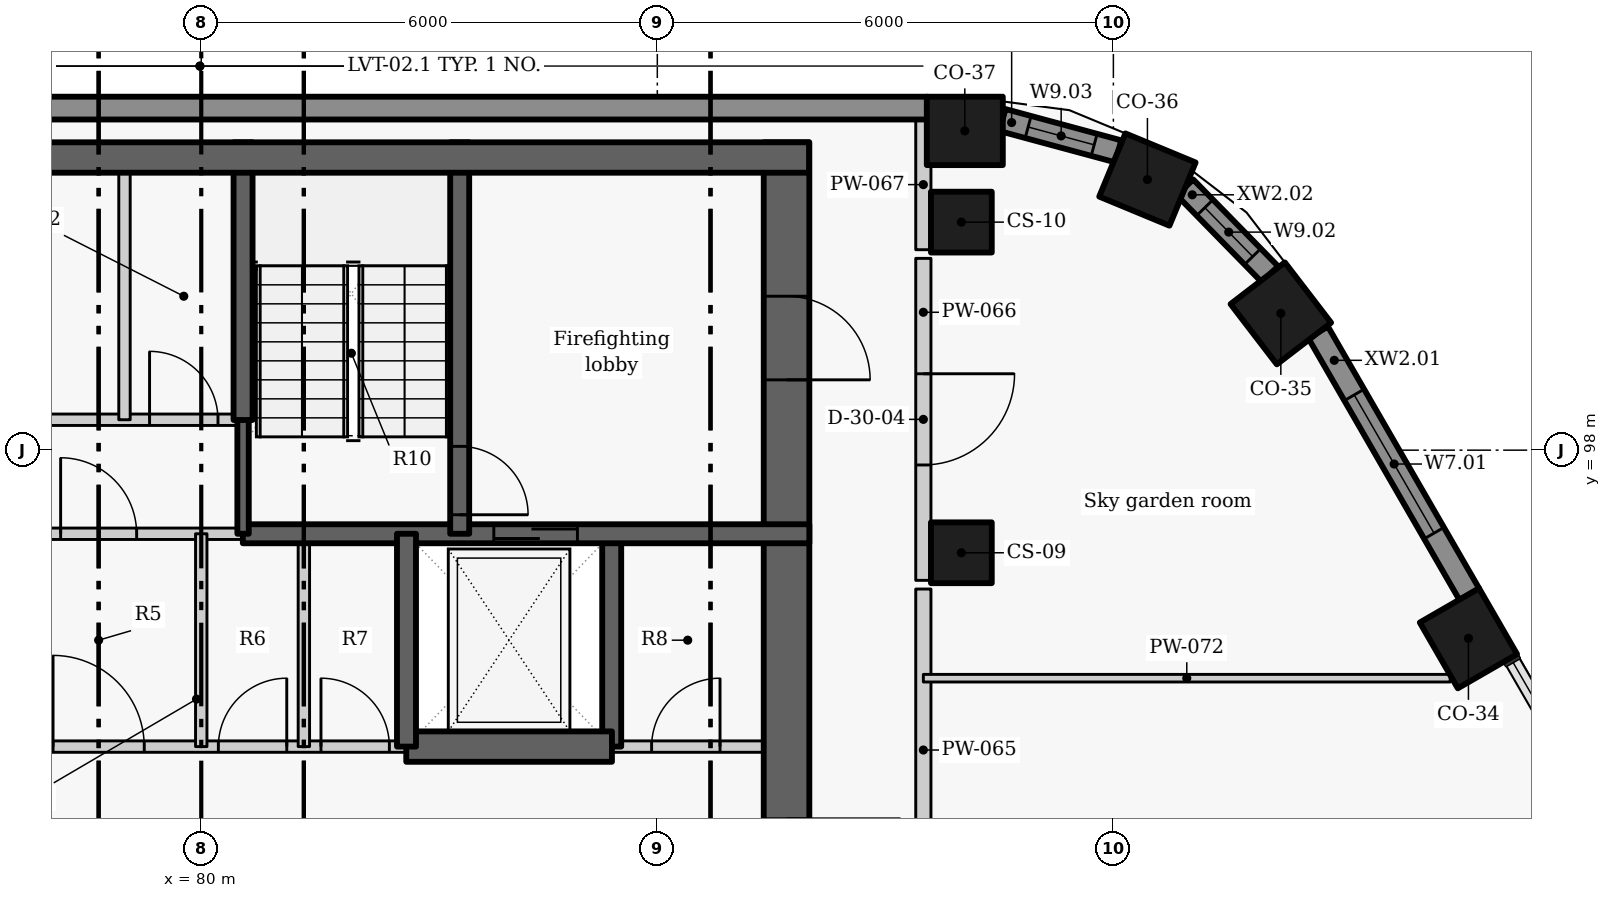
"""IFC4 building model, lengths in metres.
Left out: names, types, materials, properties, quantities, classifications, styles, units other than length and angle.
Written with IfcOpenShell. Run it as: python <this file> out.ifc"""

import sys

from ifc_helpers import new_model, si_unit, direction, frame, frame_2d, origin, origin_2d, place, context, subcontext, project, spatial, rectangle, extrude, element, fill, save


model = new_model("IFC4")
c1 = context("Model", 3, precision=1e-05, world=origin(), true_north=direction((0.0, 1.0)))
c2 = subcontext(c1, "Body", "Model", "MODEL_VIEW")
j1 = project(units=[si_unit("LENGTHUNIT", "METRE"), si_unit("PLANEANGLEUNIT", "RADIAN")], contexts=[c1])
p1 = place(None, origin())
s1 = spatial("IfcSite", under=j1, at=p1, CompositionType="ELEMENT")
p2 = place(p1, origin())
s2 = spatial("IfcBuilding", under=s1, at=p2, CompositionType="ELEMENT")
p3 = place(p2, frame((0.0, 0.0, 272.4)))
s3 = spatial("IfcBuildingStorey", under=s2, at=p3, CompositionType="ELEMENT", Elevation=272.4)
for number, where, z_axis, x_axis in (
    (1, (96.671, 95.525, 0.0), (0.0, 0.0, 1.0), (-0.5, 0.866, 0.0)),
    (2, (94.203, 99.8, 0.0), (0.0, 0.0, 1.0), (-0.609, 0.793, 0.0)),
    (3, (92.448, 101.56, 0.0), (0.0, 0.0, 1.0), (-0.924, 0.383, 0.0)),
    (4, (90.045, 102.2, 0.0), (0.0, 0.0, 1.0), (-1.0, 0.0, 0.0)),
):
    element("IfcColumn", number, at=place(p3, frame(where, z_axis=z_axis, x_axis=x_axis)), inside=s3, PredefinedType="COLUMN", context=c2, shape_type="SweptSolid", body=[
        extrude(rectangle(XDim=1.0, YDim=0.9, at=origin_2d()), origin(), (0.0, 0.0, 1.0), 3.6),
    ])
for number, where, z_axis, x_axis in (
    (5, (90.0, 96.65, 0.0), (0.0, 0.0, 1.0), (0.0, 1.0, 0.0)),
    (6, (90.0, 101.0, 0.0), (0.0, 0.0, 1.0), (0.0, 1.0, 0.0)),
):
    element("IfcColumn", number, at=place(p3, frame(where, z_axis=z_axis, x_axis=x_axis)), inside=s3, PredefinedType="COLUMN", context=c2, shape_type="SweptSolid", body=[
        extrude(rectangle(XDim=0.8, YDim=0.8, at=origin_2d()), origin(), (0.0, 0.0, 1.0), 3.6),
    ])
p4 = place(p3, frame((96.683, 96.104, 0.0), z_axis=(0.0, 0.0, 1.0), x_axis=(-0.500005687176, 0.866022120267, 0.0)))
e7 = element("IfcWall", 7, at=p4, inside=s3, PredefinedType="SOLIDWALL", context=c2, shape_type="SweptSolid", body=[
    extrude(rectangle(XDim=3.979, YDim=0.3, at=frame_2d((1.99, 0.0))), origin(), (0.0, 0.0, 1.0), 2.725),
])
p5 = place(p4, frame((0.928, 0.0, 0.9)))
e8 = element("IfcOpeningElement", 8, at=p5, cuts=e7, PredefinedType="OPENING", context=c2, shape_type="SweptSolid", body=[
    extrude(rectangle(XDim=2.1, YDim=1.1, at=frame_2d((1.05, 0.55))), frame((0.0, 0.16, 0.0), z_axis=(0.0, -1.0, 0.0), x_axis=(1.0, 0.0, 0.0)), (0.0, 0.0, 1.0), 0.32),
])
p6 = place(p3, frame((94.06, 100.315, 0.0), z_axis=(0.0, 0.0, 1.0), x_axis=(-0.6992720923, 0.714855608449, 0.0)))
e9 = element("IfcWall", 9, at=p6, inside=s3, PredefinedType="SOLIDWALL", context=c2, shape_type="SweptSolid", body=[
    extrude(rectangle(XDim=1.598, YDim=0.3, at=frame_2d((0.799, 0.0))), origin(), (0.0, 0.0, 1.0), 2.725),
])
p7 = place(p6, frame((0.325, 0.0, 0.9)))
e10 = element("IfcOpeningElement", 10, at=p7, cuts=e9, PredefinedType="OPENING", context=c2, shape_type="SweptSolid", body=[
    extrude(rectangle(XDim=0.9, YDim=1.1, at=frame_2d((0.45, 0.55))), frame((0.0, 0.16, 0.0), z_axis=(0.0, -1.0, 0.0), x_axis=(1.0, 0.0, 0.0)), (0.0, 0.0, 1.0), 0.32),
])
p8 = place(p3, frame((92.065, 101.931, 0.0), z_axis=(0.0, 0.0, 1.0), x_axis=(-0.965371819036, 0.260877846914, 0.0)))
e11 = element("IfcWall", 11, at=p8, inside=s3, PredefinedType="SOLIDWALL", context=c2, shape_type="SweptSolid", body=[
    extrude(rectangle(XDim=1.578, YDim=0.3, at=frame_2d((0.789, 0.0))), origin(), (0.0, 0.0, 1.0), 2.725),
])
p9 = place(p8, frame((0.329, 0.0, 0.9)))
e12 = element("IfcOpeningElement", 12, at=p9, cuts=e11, PredefinedType="OPENING", context=c2, shape_type="SweptSolid", body=[
    extrude(rectangle(XDim=0.9, YDim=1.1, at=frame_2d((0.45, 0.55))), frame((0.0, 0.16, 0.0), z_axis=(0.0, -1.0, 0.0), x_axis=(1.0, 0.0, 0.0)), (0.0, 0.0, 1.0), 0.32),
])
p10 = place(p3, frame((89.549, 102.5, 0.0), z_axis=(0.0, 0.0, 1.0), x_axis=(-1.0, 0.0, 0.0)))
e13 = element("IfcWall", 13, at=p10, inside=s3, PredefinedType="SOLIDWALL", context=c2, shape_type="SweptSolid", body=[
    extrude(rectangle(XDim=19.134, YDim=0.3, at=frame_2d((9.567, 0.0))), origin(), (0.0, 0.0, 1.0), 2.725),
])
p11 = place(p3, frame((85.4, 94.1, -0.275), z_axis=(0.0, 0.0, 1.0), x_axis=(0.0, 1.0, 0.0)))
e14 = element("IfcWall", 14, at=p11, inside=s3, PredefinedType="SHEAR", context=c2, shape_type="SweptSolid", body=[
    extrude(rectangle(XDim=2.8, YDim=0.25, at=frame_2d((1.4, 0.0))), origin(), (0.0, 0.0, 1.0), 3.6),
])
p12 = place(p3, frame((87.7, 102.05, -0.275), z_axis=(0.0, 0.0, 1.0), x_axis=(0.0, -1.0, 0.0)))
e15 = element("IfcWall", 15, at=p12, inside=s3, PredefinedType="SHEAR", context=c2, shape_type="SweptSolid", body=[
    extrude(rectangle(XDim=14.25, YDim=0.6, at=frame_2d((7.125, 0.0))), origin(), (0.0, 0.0, 1.0), 3.6),
])
p13 = place(p12, frame((8.9, 0.0, 0.275)))
e16 = element("IfcOpeningElement", 16, at=p13, cuts=e15, PredefinedType="OPENING", context=c2, shape_type="SweptSolid", body=[
    extrude(rectangle(XDim=1.5, YDim=2.1, at=frame_2d((0.75, 1.05))), frame((0.0, 0.31, 0.0), z_axis=(0.0, -1.0, 0.0), x_axis=(1.0, 0.0, 0.0)), (0.0, 0.0, 1.0), 0.62),
])
p14 = place(p12, frame((2.025, 0.0, 0.275)))
e17 = element("IfcOpeningElement", 17, at=p14, cuts=e15, PredefinedType="OPENING", context=c2, shape_type="SweptSolid", body=[
    extrude(rectangle(XDim=1.1, YDim=2.1, at=frame_2d((0.55, 1.05))), frame((0.0, 0.31, 0.0), z_axis=(0.0, -1.0, 0.0), x_axis=(1.0, 0.0, 0.0)), (0.0, 0.0, 1.0), 0.62),
])
p15 = place(p3, frame((72.0, 94.1, 0.0), z_axis=(0.0, 0.0, 1.0), x_axis=(1.0, 0.0, 0.0)))
e18 = element("IfcWall", 18, at=p15, inside=s3, PredefinedType="PARTITIONING", context=c2, shape_type="SweptSolid", body=[
    extrude(rectangle(XDim=10.703, YDim=0.15, at=frame_2d((5.352, 0.0))), origin(), (0.0, 0.0, 1.0), 3.325),
])
p16 = place(p15, frame((1.075, 0.0, 0.0)))
e19 = element("IfcOpeningElement", 19, at=p16, cuts=e18, PredefinedType="OPENING", context=c2, shape_type="SweptSolid", body=[
    extrude(rectangle(XDim=1.1, YDim=2.1, at=frame_2d((0.55, 1.05))), frame((0.0, 0.085, 0.0), z_axis=(0.0, -1.0, 0.0), x_axis=(1.0, 0.0, 0.0)), (0.0, 0.0, 1.0), 0.17),
])
p17 = place(p15, frame((3.5, 0.0, 0.0)))
e20 = element("IfcOpeningElement", 20, at=p17, cuts=e18, PredefinedType="OPENING", context=c2, shape_type="SweptSolid", body=[
    extrude(rectangle(XDim=0.9, YDim=2.1, at=frame_2d((0.45, 1.05))), frame((0.0, 0.085, 0.0), z_axis=(0.0, -1.0, 0.0), x_axis=(1.0, 0.0, 0.0)), (0.0, 0.0, 1.0), 0.17),
])
p18 = place(p15, frame((6.05, 0.0, 0.0)))
e21 = element("IfcOpeningElement", 21, at=p18, cuts=e18, PredefinedType="OPENING", context=c2, shape_type="SweptSolid", body=[
    extrude(rectangle(XDim=1.2, YDim=2.1, at=frame_2d((0.6, 1.05))), frame((0.0, 0.085, 0.0), z_axis=(0.0, -1.0, 0.0), x_axis=(1.0, 0.0, 0.0)), (0.0, 0.0, 1.0), 0.17),
])
p19 = place(p15, frame((8.225, 0.0, 0.0)))
e22 = element("IfcOpeningElement", 22, at=p19, cuts=e18, PredefinedType="OPENING", context=c2, shape_type="SweptSolid", body=[
    extrude(rectangle(XDim=0.9, YDim=2.1, at=frame_2d((0.45, 1.05))), frame((0.0, 0.085, 0.0), z_axis=(0.0, -1.0, 0.0), x_axis=(1.0, 0.0, 0.0)), (0.0, 0.0, 1.0), 0.17),
])
p20 = place(p15, frame((9.575, 0.0, 0.0)))
e23 = element("IfcOpeningElement", 23, at=p20, cuts=e18, PredefinedType="OPENING", context=c2, shape_type="SweptSolid", body=[
    extrude(rectangle(XDim=0.9, YDim=2.1, at=frame_2d((0.45, 1.05))), frame((0.0, 0.085, 0.0), z_axis=(0.0, -1.0, 0.0), x_axis=(1.0, 0.0, 0.0)), (0.0, 0.0, 1.0), 0.17),
])
p21 = place(p3, frame((85.397, 94.1, 0.0), z_axis=(0.0, 0.0, 1.0), x_axis=(1.0, 0.0, 0.0)))
e24 = element("IfcWall", 24, at=p21, inside=s3, PredefinedType="PARTITIONING", context=c2, shape_type="SweptSolid", body=[
    extrude(rectangle(XDim=2.603, YDim=0.15, at=frame_2d((1.302, 0.0))), origin(), (0.0, 0.0, 1.0), 3.325),
])
p22 = place(p21, frame((0.528, 0.0, 0.0)))
e25 = element("IfcOpeningElement", 25, at=p22, cuts=e24, PredefinedType="OPENING", context=c2, shape_type="SweptSolid", body=[
    extrude(rectangle(XDim=0.9, YDim=2.1, at=frame_2d((0.45, 1.05))), frame((0.0, 0.085, 0.0), z_axis=(0.0, -1.0, 0.0), x_axis=(1.0, 0.0, 0.0)), (0.0, 0.0, 1.0), 0.17),
])
p23 = place(p3, frame((82.697, 94.1, -0.275), z_axis=(0.0, 0.0, 1.0), x_axis=(1.0, 0.0, 0.0)))
e26 = element("IfcWall", 26, at=p23, inside=s3, PredefinedType="SHEAR", context=c2, shape_type="SweptSolid", body=[
    extrude(rectangle(XDim=2.706, YDim=0.4, at=frame_2d((1.353, 0.0))), origin(), (0.0, 0.0, 1.0), 3.6),
])
p24 = place(p3, frame((80.547, 96.9, -0.275), z_axis=(0.0, 0.0, 1.0), x_axis=(1.0, 0.0, 0.0)))
e27 = element("IfcWall", 27, at=p24, inside=s3, PredefinedType="SHEAR", context=c2, shape_type="SweptSolid", body=[
    extrude(rectangle(XDim=7.453, YDim=0.25, at=frame_2d((3.727, 0.0))), origin(), (0.0, 0.0, 1.0), 3.6),
])
p25 = place(p24, frame((3.302, 0.0, 0.275)))
e28 = element("IfcOpeningElement", 28, at=p25, cuts=e27, PredefinedType="OPENING", context=c2, shape_type="SweptSolid", body=[
    extrude(rectangle(XDim=1.1, YDim=2.1, at=frame_2d((0.55, 1.05))), frame((0.0, 0.135, 0.0), z_axis=(0.0, -1.0, 0.0), x_axis=(1.0, 0.0, 0.0)), (0.0, 0.0, 1.0), 0.27),
])
p26 = place(p3, frame((75.347, 96.9, 0.0), z_axis=(0.0, 0.0, 1.0), x_axis=(1.0, 0.0, 0.0)))
e29 = element("IfcWall", 29, at=p26, inside=s3, PredefinedType="PARTITIONING", context=c2, shape_type="SweptSolid", body=[
    extrude(rectangle(XDim=5.206, YDim=0.15, at=frame_2d((2.603, 0.0))), origin(), (0.0, 0.0, 1.0), 3.325),
])
p27 = place(p26, frame((2.803, 0.0, 0.0)))
e30 = element("IfcOpeningElement", 30, at=p27, cuts=e29, PredefinedType="OPENING", context=c2, shape_type="SweptSolid", body=[
    extrude(rectangle(XDim=1.0, YDim=2.1, at=frame_2d((0.5, 1.05))), frame((0.0, 0.085, 0.0), z_axis=(0.0, -1.0, 0.0), x_axis=(1.0, 0.0, 0.0)), (0.0, 0.0, 1.0), 0.17),
])
for number, where, z_axis, x_axis in (
    (31, (80.0, 94.1, 0.0), (0.0, 0.0, 1.0), (0.0, 1.0, 0.0)),
    (32, (81.35, 94.1, 0.0), (0.0, 0.0, 1.0), (0.0, 1.0, 0.0)),
):
    element("IfcWall", number, at=place(p3, frame(where, z_axis=z_axis, x_axis=x_axis)), inside=s3, PredefinedType="PARTITIONING", context=c2, shape_type="SweptSolid", body=[
        extrude(rectangle(XDim=2.8, YDim=0.15, at=frame_2d((1.4, 0.0))), origin(), (0.0, 0.0, 1.0), 3.325),
    ])
p28 = place(p3, frame((82.7, 94.1, -0.275), z_axis=(0.0, 0.0, 1.0), x_axis=(0.0, 1.0, 0.0)))
e33 = element("IfcWall", 33, at=p28, inside=s3, PredefinedType="SHEAR", context=c2, shape_type="SweptSolid", body=[
    extrude(rectangle(XDim=2.8, YDim=0.25, at=frame_2d((1.4, 0.0))), origin(), (0.0, 0.0, 1.0), 3.6),
])
p29 = place(p3, frame((83.4, 102.05, -0.275), z_axis=(0.0, 0.0, 1.0), x_axis=(0.0, -1.0, 0.0)))
e34 = element("IfcWall", 34, at=p29, inside=s3, PredefinedType="SHEAR", context=c2, shape_type="SweptSolid", body=[
    extrude(rectangle(XDim=5.15, YDim=0.25, at=frame_2d((2.575, 0.0))), origin(), (0.0, 0.0, 1.0), 3.6),
])
p30 = place(p29, frame((4.0, 0.0, 0.275)))
e35 = element("IfcOpeningElement", 35, at=p30, cuts=e34, PredefinedType="OPENING", context=c2, shape_type="SweptSolid", body=[
    extrude(rectangle(XDim=0.9, YDim=2.1, at=frame_2d((0.45, 1.05))), frame((0.0, 0.135, 0.0), z_axis=(0.0, -1.0, 0.0), x_axis=(1.0, 0.0, 0.0)), (0.0, 0.0, 1.0), 0.27),
])
p31 = place(p3, frame((80.55, 96.9, -0.275), z_axis=(0.0, 0.0, 1.0), x_axis=(0.0, 1.0, 0.0)))
e36 = element("IfcWall", 36, at=p31, inside=s3, PredefinedType="SHEAR", context=c2, shape_type="SweptSolid", body=[
    extrude(rectangle(XDim=1.503, YDim=0.15, at=frame_2d((0.751, 0.0))), origin(), (0.0, 0.0, 1.0), 3.6),
])
p32 = place(p3, frame((80.55, 98.397, -0.275), z_axis=(0.0, 0.0, 1.0), x_axis=(0.0, 1.0, 0.0)))
e37 = element("IfcWall", 37, at=p32, inside=s3, PredefinedType="SHEAR", context=c2, shape_type="SweptSolid", body=[
    extrude(rectangle(XDim=3.653, YDim=0.25, at=frame_2d((1.827, 0.0))), origin(), (0.0, 0.0, 1.0), 3.6),
])
p33 = place(p3, frame((75.35, 98.4, 0.0), z_axis=(0.0, 0.0, 1.0), x_axis=(1.0, 0.0, 0.0)))
e38 = element("IfcWall", 38, at=p33, inside=s3, PredefinedType="PARTITIONING", context=c2, shape_type="SweptSolid", body=[
    extrude(rectangle(XDim=5.2, YDim=0.15, at=frame_2d((2.6, 0.0))), origin(), (0.0, 0.0, 1.0), 3.325),
])
p34 = place(p33, frame((1.37, 0.0, 0.0)))
e39 = element("IfcOpeningElement", 39, at=p34, cuts=e38, PredefinedType="OPENING", context=c2, shape_type="SweptSolid", body=[
    extrude(rectangle(XDim=0.9, YDim=2.1, at=frame_2d((0.45, 1.05))), frame((0.0, 0.085, 0.0), z_axis=(0.0, -1.0, 0.0), x_axis=(1.0, 0.0, 0.0)), (0.0, 0.0, 1.0), 0.17),
])
p35 = place(p33, frame((3.97, 0.0, 0.0)))
e40 = element("IfcOpeningElement", 40, at=p35, cuts=e38, PredefinedType="OPENING", context=c2, shape_type="SweptSolid", body=[
    extrude(rectangle(XDim=0.9, YDim=2.1, at=frame_2d((0.45, 1.05))), frame((0.0, 0.085, 0.0), z_axis=(0.0, -1.0, 0.0), x_axis=(1.0, 0.0, 0.0)), (0.0, 0.0, 1.0), 0.17),
])
p36 = place(p3, frame((78.99, 98.4, 0.0), z_axis=(0.0, 0.0, 1.0), x_axis=(0.0, 1.0, 0.0)))
e41 = element("IfcWall", 41, at=p36, inside=s3, PredefinedType="PARTITIONING", context=c2, shape_type="SweptSolid", body=[
    extrude(rectangle(XDim=3.65, YDim=0.15, at=frame_2d((1.825, 0.0))), origin(), (0.0, 0.0, 1.0), 3.325),
])
p37 = place(p3, frame((89.5, 91.937, 0.0), z_axis=(0.0, 0.0, 1.0), x_axis=(0.0, 1.0, 0.0)))
e42 = element("IfcWall", 42, at=p37, inside=s3, PredefinedType="PARTITIONING", context=c2, shape_type="SweptSolid", body=[
    extrude(rectangle(XDim=4.236, YDim=0.2, at=frame_2d((2.118, 0.0))), origin(), (0.0, 0.0, 1.0), 3.325),
])
p38 = place(p3, frame((89.5, 100.523, 0.0), z_axis=(0.0, 0.0, 1.0), x_axis=(0.0, -1.0, 0.0)))
e43 = element("IfcWall", 43, at=p38, inside=s3, PredefinedType="PARTITIONING", context=c2, shape_type="SweptSolid", body=[
    extrude(rectangle(XDim=4.236, YDim=0.2, at=frame_2d((2.118, 0.0))), origin(), (0.0, 0.0, 1.0), 3.325),
])
p39 = place(p38, frame((1.518, 0.0, 0.0)))
e44 = element("IfcOpeningElement", 44, at=p39, cuts=e43, PredefinedType="OPENING", context=c2, shape_type="SweptSolid", body=[
    extrude(rectangle(XDim=1.2, YDim=2.1, at=frame_2d((0.6, 1.05))), frame((0.0, 0.11, 0.0), z_axis=(0.0, -1.0, 0.0), x_axis=(1.0, 0.0, 0.0)), (0.0, 0.0, 1.0), 0.22),
])
p40 = place(p3, frame((89.5, 100.637, 0.0), z_axis=(0.0, 0.0, 1.0), x_axis=(0.0, 1.0, 0.0)))
e45 = element("IfcWall", 45, at=p40, inside=s3, PredefinedType="PARTITIONING", context=c2, shape_type="SweptSolid", body=[
    extrude(rectangle(XDim=1.713, YDim=0.2, at=frame_2d((0.856, 0.0))), origin(), (0.0, 0.0, 1.0), 3.325),
])
p41 = place(p3, frame((89.5, 95.0, 0.0), z_axis=(0.0, 0.0, 1.0), x_axis=(1.0, 0.0, 0.0)))
e46 = element("IfcWall", 46, at=p41, inside=s3, PredefinedType="PARTITIONING", context=c2, shape_type="SweptSolid", body=[
    extrude(rectangle(XDim=6.931, YDim=0.1, at=frame_2d((3.466, 0.0))), origin(), (0.0, 0.0, 1.0), 2.805),
])
p42 = place(p3, frame((72.004, 101.85, -0.275), z_axis=(0.0, 0.0, 1.0), x_axis=(1.0, 0.0, 0.0)))
e47 = element("IfcWall", 47, at=p42, inside=s3, PredefinedType="SHEAR", context=c2, shape_type="SweptSolid", body=[
    extrude(rectangle(XDim=15.992, YDim=0.4, at=frame_2d((7.996, 0.0))), origin(), (0.0, 0.0, 1.0), 3.6),
])
p43 = place(p5, origin())
e48 = element("IfcWindow", 48, at=p43, inside=s3, PartitioningType="SINGLE_PANEL", PredefinedType="WINDOW", context=c2, shape_type="SweptSolid", body=[
    extrude(rectangle(XDim=2.1, YDim=1.1, at=frame_2d((1.05, 0.55))), frame((0.0, 0.03, 0.0), z_axis=(0.0, -1.0, 0.0), x_axis=(1.0, 0.0, 0.0)), (0.0, 0.0, 1.0), 0.06),
])
fill(e8, e48)
p44 = place(p7, origin())
e49 = element("IfcWindow", 49, at=p44, inside=s3, PartitioningType="SINGLE_PANEL", PredefinedType="WINDOW", context=c2, shape_type="SweptSolid", body=[
    extrude(rectangle(XDim=0.9, YDim=1.1, at=frame_2d((0.45, 0.55))), frame((0.0, 0.03, 0.0), z_axis=(0.0, -1.0, 0.0), x_axis=(1.0, 0.0, 0.0)), (0.0, 0.0, 1.0), 0.06),
])
fill(e10, e49)
p45 = place(p9, origin())
e50 = element("IfcWindow", 50, at=p45, inside=s3, PartitioningType="SINGLE_PANEL", PredefinedType="WINDOW", context=c2, shape_type="SweptSolid", body=[
    extrude(rectangle(XDim=0.9, YDim=1.1, at=frame_2d((0.45, 0.55))), frame((0.0, 0.03, 0.0), z_axis=(0.0, -1.0, 0.0), x_axis=(1.0, 0.0, 0.0)), (0.0, 0.0, 1.0), 0.06),
])
fill(e12, e50)
p46 = place(p18, origin())
e51 = element("IfcDoor", 51, at=p46, inside=s3, OperationType="DOUBLE_DOOR_SINGLE_SWING", PredefinedType="DOOR", context=c2, shape_type="SweptSolid", body=[
    extrude(rectangle(XDim=1.2, YDim=2.1, at=frame_2d((0.6, 1.05))), frame((0.0, 0.025, 0.0), z_axis=(0.0, -1.0, 0.0), x_axis=(1.0, 0.0, 0.0)), (0.0, 0.0, 1.0), 0.05),
])
fill(e21, e51)
p47 = place(p19, origin())
e52 = element("IfcDoor", 52, at=p47, inside=s3, OperationType="SINGLE_SWING_RIGHT", PredefinedType="DOOR", context=c2, shape_type="SweptSolid", body=[
    extrude(rectangle(XDim=0.9, YDim=2.1, at=frame_2d((0.45, 1.05))), frame((0.0, 0.025, 0.0), z_axis=(0.0, -1.0, 0.0), x_axis=(1.0, 0.0, 0.0)), (0.0, 0.0, 1.0), 0.05),
])
fill(e22, e52)
p48 = place(p20, origin())
e53 = element("IfcDoor", 53, at=p48, inside=s3, OperationType="SINGLE_SWING_LEFT", PredefinedType="DOOR", context=c2, shape_type="SweptSolid", body=[
    extrude(rectangle(XDim=0.9, YDim=2.1, at=frame_2d((0.45, 1.05))), frame((0.0, 0.025, 0.0), z_axis=(0.0, -1.0, 0.0), x_axis=(1.0, 0.0, 0.0)), (0.0, 0.0, 1.0), 0.05),
])
fill(e23, e53)
p49 = place(p25, origin())
e54 = element("IfcDoor", 54, at=p49, inside=s3, OperationType="SLIDING_TO_LEFT", PredefinedType="DOOR", context=c2, shape_type="SweptSolid", body=[
    extrude(rectangle(XDim=1.1, YDim=2.1, at=frame_2d((0.55, 1.05))), frame((0.0, 0.025, 0.0), z_axis=(0.0, -1.0, 0.0), x_axis=(1.0, 0.0, 0.0)), (0.0, 0.0, 1.0), 0.05),
])
fill(e28, e54)
p50 = place(p22, origin())
e55 = element("IfcDoor", 55, at=p50, inside=s3, OperationType="SINGLE_SWING_RIGHT", PredefinedType="DOOR", context=c2, shape_type="SweptSolid", body=[
    extrude(rectangle(XDim=0.9, YDim=2.1, at=frame_2d((0.45, 1.05))), frame((0.0, 0.025, 0.0), z_axis=(0.0, -1.0, 0.0), x_axis=(1.0, 0.0, 0.0)), (0.0, 0.0, 1.0), 0.05),
])
fill(e25, e55)
p51 = place(p27, origin())
e56 = element("IfcDoor", 56, at=p51, inside=s3, OperationType="SINGLE_SWING_LEFT", PredefinedType="DOOR", context=c2, shape_type="SweptSolid", body=[
    extrude(rectangle(XDim=1.0, YDim=2.1, at=frame_2d((0.5, 1.05))), frame((0.0, 0.025, 0.0), z_axis=(0.0, -1.0, 0.0), x_axis=(1.0, 0.0, 0.0)), (0.0, 0.0, 1.0), 0.05),
])
fill(e30, e56)
p52 = place(p35, origin())
e57 = element("IfcDoor", 57, at=p52, inside=s3, OperationType="SINGLE_SWING_LEFT", PredefinedType="DOOR", context=c2, shape_type="SweptSolid", body=[
    extrude(rectangle(XDim=0.9, YDim=2.1, at=frame_2d((0.45, 1.05))), frame((0.0, 0.025, 0.0), z_axis=(0.0, -1.0, 0.0), x_axis=(1.0, 0.0, 0.0)), (0.0, 0.0, 1.0), 0.05),
])
fill(e40, e57)
p53 = place(p30, origin())
e58 = element("IfcDoor", 58, at=p53, inside=s3, OperationType="SINGLE_SWING_RIGHT", PredefinedType="DOOR", context=c2, shape_type="SweptSolid", body=[
    extrude(rectangle(XDim=0.9, YDim=2.1, at=frame_2d((0.45, 1.05))), frame((0.0, 0.025, 0.0), z_axis=(0.0, -1.0, 0.0), x_axis=(1.0, 0.0, 0.0)), (0.0, 0.0, 1.0), 0.05),
])
fill(e35, e58)
p54 = place(p39, origin())
e59 = element("IfcDoor", 59, at=p54, inside=s3, OperationType="SINGLE_SWING_LEFT", PredefinedType="DOOR", context=c2, shape_type="SweptSolid", body=[
    extrude(rectangle(XDim=1.2, YDim=2.1, at=frame_2d((0.6, 1.05))), frame((0.0, 0.025, 0.0), z_axis=(0.0, -1.0, 0.0), x_axis=(1.0, 0.0, 0.0)), (0.0, 0.0, 1.0), 0.05),
])
fill(e44, e59)
p55 = place(p13, origin())
e60 = element("IfcDoor", 60, at=p55, inside=s3, OperationType="DOUBLE_DOOR_SINGLE_SWING", PredefinedType="DOOR", context=c2, shape_type="SweptSolid", body=[
    extrude(rectangle(XDim=1.5, YDim=2.1, at=frame_2d((0.75, 1.05))), frame((0.0, 0.025, 0.0), z_axis=(0.0, -1.0, 0.0), x_axis=(1.0, 0.0, 0.0)), (0.0, 0.0, 1.0), 0.05),
])
fill(e16, e60)
p56 = place(p14, origin())
e61 = element("IfcDoor", 61, at=p56, inside=s3, OperationType="SINGLE_SWING_RIGHT", PredefinedType="DOOR", context=c2, shape_type="SweptSolid", body=[
    extrude(rectangle(XDim=1.1, YDim=2.1, at=frame_2d((0.55, 1.05))), frame((0.0, 0.025, 0.0), z_axis=(0.0, -1.0, 0.0), x_axis=(1.0, 0.0, 0.0)), (0.0, 0.0, 1.0), 0.05),
])
fill(e17, e61)
save(model, sys.argv[1])
